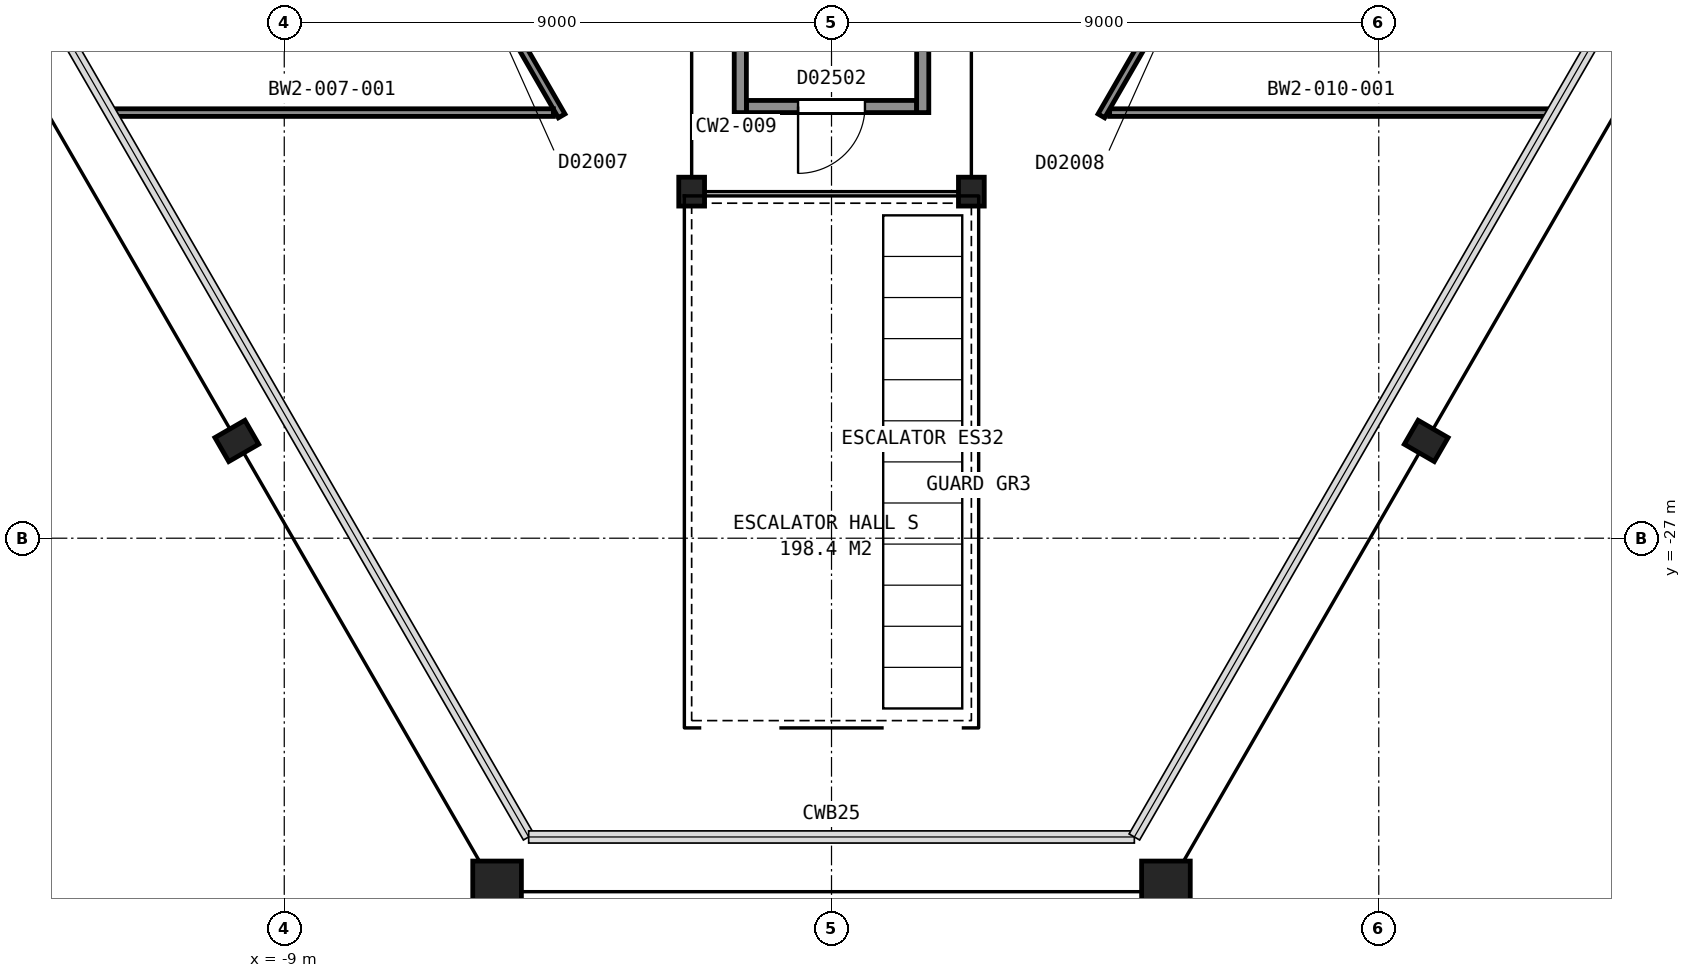
"""IFC4 building model, lengths in metres.
Left out: names, types, materials, properties, quantities, classifications, styles, units other than length and angle.
Written with IfcOpenShell. Run it as: python <this file> out.ifc"""

import sys

from ifc_helpers import new_model, si_unit, direction, frame, frame_2d, origin, origin_2d, place, context, subcontext, project, spatial, rectangle, hollow_rectangle, i_section, extrude, element, fill, save


model = new_model("IFC4")
c1 = context("Model", 3, precision=1e-05, world=origin(), true_north=direction((0.0, 1.0)))
c2 = subcontext(c1, "Body", "Model", "MODEL_VIEW")
j1 = project(units=[si_unit("LENGTHUNIT", "METRE"), si_unit("PLANEANGLEUNIT", "RADIAN")], contexts=[c1])
p1 = place(None, origin())
s1 = spatial("IfcSite", under=j1, at=p1, CompositionType="ELEMENT")
p2 = place(p1, origin())
s2 = spatial("IfcBuilding", under=s1, at=p2, CompositionType="ELEMENT")
p3 = place(p2, frame((0.0, 0.0, 17.4)))
s3 = spatial("IfcBuildingStorey", under=s2, at=p3, CompositionType="ELEMENT", Elevation=17.4)
p4 = place(p3, frame((-9.78, -25.4, -0.16), z_axis=(0.0, 0.0, 1.0), x_axis=(-0.5, 0.866025403784, 0.0)))
e1 = element("IfcColumn", 1, at=p4, inside=s3, PredefinedType="COLUMN", context=c2, shape_type="SweptSolid", body=[
    extrude(i_section(OverallWidth=0.455, OverallDepth=0.569, WebThickness=0.078, FlangeThickness=0.125, FilletRadius=0.015, at=origin_2d()), origin(), (0.0, 0.0, 1.0), 5.16),
])
for number, where, z_axis, x_axis in (
    (2, (-5.5, -32.81, 0.0), (0.0, 0.0, 1.0), (-1.0, 0.0, 0.0)),
    (3, (5.5, -32.81, 0.0), (0.0, 0.0, 1.0), (-1.0, 0.0, 0.0)),
):
    element("IfcColumn", number, at=place(p3, frame(where, z_axis=z_axis, x_axis=x_axis)), inside=s3, PredefinedType="COLUMN", context=c2, shape_type="SweptSolid", body=[
        extrude(hollow_rectangle(XDim=0.8, YDim=1.0, WallThickness=0.075, at=origin_2d()), origin(), (0.0, 0.0, 1.0), 5.0),
    ])
p5 = place(p3, frame((9.78, -25.4, -0.16), z_axis=(0.0, 0.0, 1.0), x_axis=(-0.5, -0.866025403784, 0.0)))
e4 = element("IfcColumn", 4, at=p5, inside=s3, PredefinedType="COLUMN", context=c2, shape_type="SweptSolid", body=[
    extrude(i_section(OverallWidth=0.455, OverallDepth=0.569, WebThickness=0.078, FlangeThickness=0.125, FilletRadius=0.015, at=origin_2d()), origin(), (0.0, 0.0, 1.0), 5.16),
])
for number, where, z_axis, x_axis in (
    (5, (-2.3, -21.3, 0.0), (0.0, 0.0, 1.0), (-1.0, 0.0, 0.0)),
    (6, (2.3, -21.3, 0.0), (0.0, 0.0, 1.0), (-1.0, 0.0, 0.0)),
):
    element("IfcColumn", number, at=place(p3, frame(where, z_axis=z_axis, x_axis=x_axis)), inside=s3, PredefinedType="COLUMN", context=c2, shape_type="SweptSolid", body=[
        extrude(i_section(OverallWidth=0.424, OverallDepth=0.475, WebThickness=0.048, FlangeThickness=0.077, FilletRadius=0.015, at=origin_2d()), origin(), (0.0, 0.0, 1.0), 5.0),
    ])
p6 = place(p3, frame((-1.4, -19.9, 0.0), z_axis=(0.0, 0.0, 1.0), x_axis=(1.0, 0.0, 0.0)))
e7 = element("IfcWall", 7, at=p6, inside=s3, PredefinedType="PARTITIONING", context=c2, shape_type="SweptSolid", body=[
    extrude(rectangle(XDim=2.8, YDim=0.2, at=frame_2d((1.4, 0.0))), origin(), (0.0, 0.0, 1.0), 4.75),
])
p7 = place(p6, frame((0.85, 0.0, 0.0)))
e8 = element("IfcOpeningElement", 8, at=p7, cuts=e7, PredefinedType="OPENING", context=c2, shape_type="SweptSolid", body=[
    extrude(rectangle(XDim=1.1, YDim=2.1, at=frame_2d((0.55, 1.05))), frame((0.0, 0.11, 0.0), z_axis=(0.0, -1.0, 0.0), x_axis=(1.0, 0.0, 0.0)), (0.0, 0.0, 1.0), 0.22),
])
for number, where, z_axis, x_axis in (
    (9, (1.5, -8.0, 0.0), (0.0, 0.0, 1.0), (0.0, -1.0, 0.0)),
    (10, (-1.5, -8.0, 0.0), (0.0, 0.0, 1.0), (0.0, -1.0, 0.0)),
):
    element("IfcWall", number, at=place(p3, frame(where, z_axis=z_axis, x_axis=x_axis)), inside=s3, PredefinedType="PARTITIONING", context=c2, shape_type="SweptSolid", body=[
        extrude(rectangle(XDim=12.0, YDim=0.2, at=frame_2d((6.0, 0.0))), origin(), (0.0, 0.0, 1.0), 4.75),
    ])
p8 = place(p3, frame((-4.438, -20.054, 0.0), z_axis=(0.0, 0.0, 1.0), x_axis=(-0.499994028088, 0.866028851642, 0.0)))
e11 = element("IfcWall", 11, at=p8, inside=s3, PredefinedType="PARTITIONING", context=c2, shape_type="SweptSolid", body=[
    extrude(rectangle(XDim=30.297, YDim=0.125, at=frame_2d((15.148, 0.0))), origin(), (0.0, 0.0, 1.0), 3.853),
])
p9 = place(p8, frame((10.349, 0.0, 0.0)))
e12 = element("IfcOpeningElement", 12, at=p9, cuts=e11, PredefinedType="OPENING", context=c2, shape_type="SweptSolid", body=[
    extrude(rectangle(XDim=1.2, YDim=2.1, at=frame_2d((0.6, 1.05))), frame((0.0, 0.073, 0.0), z_axis=(0.0, -1.0, 0.0), x_axis=(1.0, 0.0, 0.0)), (0.0, 0.0, 1.0), 0.145),
])
p10 = place(p8, frame((2.916, 0.0, 0.0)))
e13 = element("IfcOpeningElement", 13, at=p10, cuts=e11, PredefinedType="OPENING", context=c2, shape_type="SweptSolid", body=[
    extrude(rectangle(XDim=1.0, YDim=2.1, at=frame_2d((0.5, 1.05))), frame((0.0, 0.073, 0.0), z_axis=(0.0, -1.0, 0.0), x_axis=(1.0, 0.0, 0.0)), (0.0, 0.0, 1.0), 0.145),
])
for number, where, z_axis, x_axis in (
    (14, (-11.859, -20.0, 0.0), (0.0, 0.0, 1.0), (1.0, 0.0, 0.0)),
    (15, (4.574, -20.0, 0.0), (0.0, 0.0, 1.0), (1.0, 0.0, 0.0)),
):
    element("IfcWall", number, at=place(p3, frame(where, z_axis=z_axis, x_axis=x_axis)), inside=s3, PredefinedType="PARTITIONING", context=c2, shape_type="SweptSolid", body=[
        extrude(rectangle(XDim=7.285, YDim=0.125, at=frame_2d((3.643, 0.0))), origin(), (0.0, 0.0, 1.0), 4.84),
    ])
p11 = place(p3, frame((19.586, 6.184, 0.0), z_axis=(0.0, 0.0, 1.0), x_axis=(-0.499994028088, -0.866028851642, 0.0)))
e16 = element("IfcWall", 16, at=p11, inside=s3, PredefinedType="PARTITIONING", context=c2, shape_type="SweptSolid", body=[
    extrude(rectangle(XDim=30.297, YDim=0.125, at=frame_2d((15.148, 0.0))), origin(), (0.0, 0.0, 1.0), 3.853),
])
p12 = place(p11, frame((26.285, 0.0, 0.0)))
e17 = element("IfcOpeningElement", 17, at=p12, cuts=e16, PredefinedType="OPENING", context=c2, shape_type="SweptSolid", body=[
    extrude(rectangle(XDim=1.2, YDim=2.1, at=frame_2d((0.6, 1.05))), frame((0.0, 0.073, 0.0), z_axis=(0.0, -1.0, 0.0), x_axis=(1.0, 0.0, 0.0)), (0.0, 0.0, 1.0), 0.145),
])
p13 = place(p11, frame((18.832, 0.0, 0.0)))
e18 = element("IfcOpeningElement", 18, at=p13, cuts=e16, PredefinedType="OPENING", context=c2, shape_type="SweptSolid", body=[
    extrude(rectangle(XDim=1.0, YDim=2.1, at=frame_2d((0.5, 1.05))), frame((0.0, 0.073, 0.0), z_axis=(0.0, -1.0, 0.0), x_axis=(1.0, 0.0, 0.0)), (0.0, 0.0, 1.0), 0.145),
])
p14 = place(p11, frame((10.349, 0.0, 0.0)))
e19 = element("IfcOpeningElement", 19, at=p14, cuts=e16, PredefinedType="OPENING", context=c2, shape_type="SweptSolid", body=[
    extrude(rectangle(XDim=1.2, YDim=2.1, at=frame_2d((0.6, 1.05))), frame((0.0, 0.073, 0.0), z_axis=(0.0, -1.0, 0.0), x_axis=(1.0, 0.0, 0.0)), (0.0, 0.0, 1.0), 0.145),
])
p15 = place(p11, frame((2.817, 0.0, 0.0)))
e20 = element("IfcOpeningElement", 20, at=p15, cuts=e16, PredefinedType="OPENING", context=c2, shape_type="SweptSolid", body=[
    extrude(rectangle(XDim=1.2, YDim=2.1, at=frame_2d((0.6, 1.05))), frame((0.0, 0.073, 0.0), z_axis=(0.0, -1.0, 0.0), x_axis=(1.0, 0.0, 0.0)), (0.0, 0.0, 1.0), 0.145),
])
p16 = place(p7, origin())
e21 = element("IfcDoor", 21, at=p16, inside=s3, OperationType="SINGLE_SWING_LEFT", PredefinedType="DOOR", context=c2, shape_type="SweptSolid", body=[
    extrude(rectangle(XDim=1.1, YDim=2.1, at=frame_2d((0.55, 1.05))), frame((0.0, 0.025, 0.0), z_axis=(0.0, -1.0, 0.0), x_axis=(1.0, 0.0, 0.0)), (0.0, 0.0, 1.0), 0.05),
])
fill(e8, e21)
save(model, sys.argv[1])
